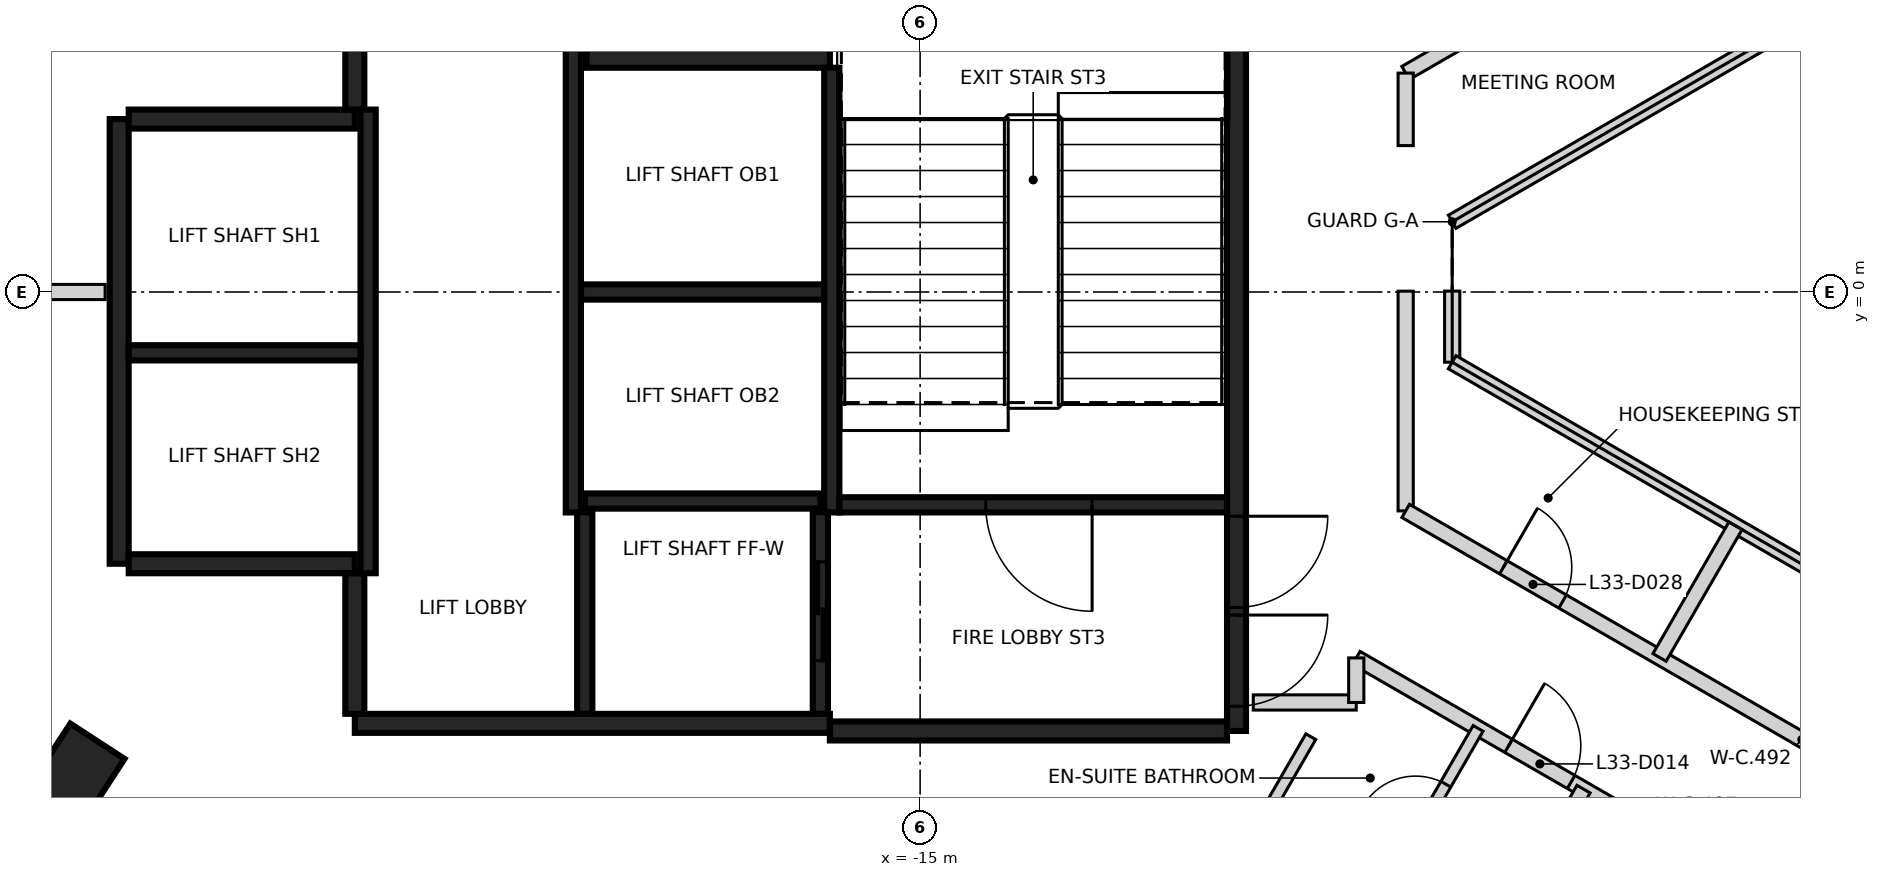
"""IFC4 building model, lengths in metres.
Left out: names, types, materials, properties, quantities, classifications, styles, units other than length and angle.
Written with IfcOpenShell. Run it as: python <this file> out.ifc"""

import sys

from ifc_helpers import new_model, si_unit, direction, frame, frame_2d, origin, origin_2d, place, context, subcontext, project, spatial, rectangle, extrude, element, fill, save


model = new_model("IFC4")
c1 = context("Model", 3, precision=1e-05, world=origin(), true_north=direction((0.0, 1.0)))
c2 = subcontext(c1, "Body", "Model", "MODEL_VIEW")
j1 = project(units=[si_unit("LENGTHUNIT", "METRE"), si_unit("PLANEANGLEUNIT", "RADIAN")], contexts=[c1])
p1 = place(None, origin())
s1 = spatial("IfcSite", under=j1, at=p1, CompositionType="ELEMENT")
p2 = place(p1, origin())
s2 = spatial("IfcBuilding", under=s1, at=p2, CompositionType="ELEMENT")
p3 = place(p2, frame((0.0, 0.0, 136.0)))
s3 = spatial("IfcBuildingStorey", under=s2, at=p3, CompositionType="ELEMENT", Elevation=136.0)
p4 = place(p3, frame((-26.165, -6.434, -0.4), z_axis=(0.0, 0.0, 1.0), x_axis=(0.545702747109, 0.837978825387, 0.0)))
e1 = element("IfcColumn", 1, at=p4, inside=s3, PredefinedType="COLUMN", context=c2, shape_type="SweptSolid", body=[
    extrude(rectangle(XDim=1.25, YDim=0.85, at=origin_2d()), origin(), (0.0, 0.0, 1.0), 3.6),
])
p5 = place(p3, frame((-10.837, 5.775, 0.0), z_axis=(0.0, 0.0, 1.0), x_axis=(0.0, -1.0, 0.0)))
e2 = element("IfcWall", 2, at=p5, inside=s3, PredefinedType="SHEAR", context=c2, shape_type="SweptSolid", body=[
    extrude(rectangle(XDim=11.55, YDim=0.25, at=frame_2d((5.775, 0.0))), origin(), (0.0, 0.0, 1.0), 3.2),
])
p6 = place(p5, frame((10.025, 0.0, 0.0)))
e3 = element("IfcOpeningElement", 3, at=p6, cuts=e2, PredefinedType="OPENING", context=c2, shape_type="SweptSolid", body=[
    extrude(rectangle(XDim=1.2, YDim=2.1, at=frame_2d((0.6, 1.05))), frame((0.0, 0.135, 0.0), z_axis=(0.0, -1.0, 0.0), x_axis=(1.0, 0.0, 0.0)), (0.0, 0.0, 1.0), 0.27),
])
p7 = place(p5, frame((8.725, 0.0, 0.0)))
e4 = element("IfcOpeningElement", 4, at=p7, cuts=e2, PredefinedType="OPENING", context=c2, shape_type="SweptSolid", body=[
    extrude(rectangle(XDim=1.2, YDim=2.1, at=frame_2d((0.6, 1.05))), frame((0.0, 0.135, 0.0), z_axis=(0.0, -1.0, 0.0), x_axis=(1.0, 0.0, 0.0)), (0.0, 0.0, 1.0), 0.27),
])
p8 = place(p3, frame((-16.187, -5.675, 0.0), z_axis=(0.0, 0.0, 1.0), x_axis=(-1.0, 0.0, 0.0)))
e5 = element("IfcWall", 5, at=p8, inside=s3, PredefinedType="SHEAR", context=c2, shape_type="SweptSolid", body=[
    extrude(rectangle(XDim=6.25, YDim=0.25, at=frame_2d((3.125, 0.0))), origin(), (0.0, 0.0, 1.0), 3.2),
])
p9 = place(p3, frame((-25.537, -3.575, 0.0), z_axis=(0.0, 0.0, 1.0), x_axis=(0.0, 1.0, 0.0)))
e6 = element("IfcWall", 6, at=p9, inside=s3, PredefinedType="SHEAR", context=c2, shape_type="SweptSolid", body=[
    extrude(rectangle(XDim=5.85, YDim=0.25, at=frame_2d((2.925, 0.0))), origin(), (0.0, 0.0, 1.0), 3.2),
])
p10 = place(p3, frame((-10.963, -5.775, 0.0), z_axis=(0.0, 0.0, 1.0), x_axis=(-1.0, 0.0, 0.0)))
e7 = element("IfcWall", 7, at=p10, inside=s3, PredefinedType="SHEAR", context=c2, shape_type="SweptSolid", body=[
    extrude(rectangle(XDim=5.225, YDim=0.25, at=frame_2d((2.612, 0.0))), origin(), (0.0, 0.0, 1.0), 3.2),
])
p11 = place(p3, frame((-19.387, 3.075, 0.0), z_axis=(0.0, 0.0, 1.0), x_axis=(1.0, 0.0, 0.0)))
e8 = element("IfcWall", 8, at=p11, inside=s3, PredefinedType="SHEAR", context=c2, shape_type="SweptSolid", body=[
    extrude(rectangle(XDim=3.2, YDim=0.25, at=frame_2d((1.6, 0.0))), origin(), (0.0, 0.0, 1.0), 3.2),
])
for number, where, z_axis, x_axis in (
    (9, (-22.437, -3.575, 0.0), (0.0, 0.0, 1.0), (-1.0, 0.0, 0.0)),
    (10, (-25.412, 2.275, 0.0), (0.0, 0.0, 1.0), (1.0, 0.0, 0.0)),
):
    element("IfcWall", number, at=place(p3, frame(where, z_axis=z_axis, x_axis=x_axis)), inside=s3, PredefinedType="SHEAR", context=c2, shape_type="SweptSolid", body=[
        extrude(rectangle(XDim=2.975, YDim=0.25, at=frame_2d((1.487, 0.0))), origin(), (0.0, 0.0, 1.0), 3.2),
    ])
p12 = place(p3, frame((-22.437, 2.4, 0.0), z_axis=(0.0, 0.0, 1.0), x_axis=(0.0, 1.0, 0.0)))
e11 = element("IfcWall", 11, at=p12, inside=s3, PredefinedType="SHEAR", context=c2, shape_type="SweptSolid", body=[
    extrude(rectangle(XDim=1.975, YDim=0.25, at=frame_2d((0.987, 0.0))), origin(), (0.0, 0.0, 1.0), 3.2),
])
p13 = place(p3, frame((-22.437, -5.55, 0.0), z_axis=(0.0, 0.0, 1.0), x_axis=(0.0, 1.0, 0.0)))
e12 = element("IfcWall", 12, at=p13, inside=s3, PredefinedType="SHEAR", context=c2, shape_type="SweptSolid", body=[
    extrude(rectangle(XDim=1.849, YDim=0.25, at=frame_2d((0.925, 0.0))), origin(), (0.0, 0.0, 1.0), 3.2),
])
p14 = place(p3, frame((-16.162, 2.951, 0.0), z_axis=(0.0, 0.0, 1.0), x_axis=(0.0, -1.0, 0.0)))
e13 = element("IfcWall", 13, at=p14, inside=s3, PredefinedType="SHEAR", context=c2, shape_type="SweptSolid", body=[
    extrude(rectangle(XDim=5.851, YDim=0.2, at=frame_2d((2.925, 0.0))), origin(), (0.0, 0.0, 1.0), 3.2),
])
for number, where, z_axis, x_axis in (
    (14, (-19.562, -2.9, 0.0), (0.0, 0.0, 1.0), (0.0, 1.0, 0.0)),
    (15, (-22.262, 2.4, 0.0), (0.0, 0.0, 1.0), (0.0, -1.0, 0.0)),
):
    element("IfcWall", number, at=place(p3, frame(where, z_axis=z_axis, x_axis=x_axis)), inside=s3, PredefinedType="SHEAR", context=c2, shape_type="SweptSolid", body=[
        extrude(rectangle(XDim=6.1, YDim=0.2, at=frame_2d((3.05, 0.0))), origin(), (0.0, 0.0, 1.0), 3.2),
    ])
p15 = place(p3, frame((-10.963, -2.8, 0.0), z_axis=(0.0, 0.0, 1.0), x_axis=(-1.0, 0.0, 0.0)))
e16 = element("IfcWall", 16, at=p15, inside=s3, PredefinedType="SHEAR", context=c2, shape_type="SweptSolid", body=[
    extrude(rectangle(XDim=5.098, YDim=0.2, at=frame_2d((2.549, 0.0))), origin(), (0.0, 0.0, 1.0), 3.2),
])
p16 = place(p15, frame((1.774, 0.0, 0.0)))
e17 = element("IfcOpeningElement", 17, at=p16, cuts=e16, PredefinedType="OPENING", context=c2, shape_type="SweptSolid", body=[
    extrude(rectangle(XDim=1.4, YDim=2.1, at=frame_2d((0.7, 1.05))), frame((0.0, 0.11, 0.0), z_axis=(0.0, -1.0, 0.0), x_axis=(1.0, 0.0, 0.0)), (0.0, 0.0, 1.0), 0.22),
])
p17 = place(p3, frame((-16.263, 0.0, 0.0), z_axis=(0.0, 0.0, 1.0), x_axis=(-1.0, 0.0, 0.0)))
e18 = element("IfcWall", 18, at=p17, inside=s3, PredefinedType="SHEAR", context=c2, shape_type="SweptSolid", body=[
    extrude(rectangle(XDim=3.198, YDim=0.2, at=frame_2d((1.599, 0.0))), origin(), (0.0, 0.0, 1.0), 3.2),
])
p18 = place(p3, frame((-22.363, -0.8, 0.0), z_axis=(0.0, 0.0, 1.0), x_axis=(-1.0, 0.0, 0.0)))
e19 = element("IfcWall", 19, at=p18, inside=s3, PredefinedType="SHEAR", context=c2, shape_type="SweptSolid", body=[
    extrude(rectangle(XDim=3.048, YDim=0.2, at=frame_2d((1.524, 0.0))), origin(), (0.0, 0.0, 1.0), 3.2),
])
p19 = place(p3, frame((-19.412, -2.75, 0.0), z_axis=(0.0, 0.0, 1.0), x_axis=(1.0, 0.0, 0.0)))
e20 = element("IfcWall", 20, at=p19, inside=s3, PredefinedType="SHEAR", context=c2, shape_type="SweptSolid", body=[
    extrude(rectangle(XDim=3.1, YDim=0.2, at=frame_2d((1.55, 0.0))), origin(), (0.0, 0.0, 1.0), 3.2),
])
p20 = place(p3, frame((-16.312, -2.898, 0.0), z_axis=(0.0, 0.0, 1.0), x_axis=(0.0, -1.0, 0.0)))
e21 = element("IfcWall", 21, at=p20, inside=s3, PredefinedType="SHEAR", context=c2, shape_type="SweptSolid", body=[
    extrude(rectangle(XDim=2.651, YDim=0.2, at=frame_2d((1.325, 0.0))), origin(), (0.0, 0.0, 1.0), 3.2),
])
p21 = place(p20, frame((0.652, 0.0, 0.0)))
e22 = element("IfcOpeningElement", 22, at=p21, cuts=e21, PredefinedType="OPENING", context=c2, shape_type="SweptSolid", body=[
    extrude(rectangle(XDim=1.3, YDim=2.1, at=frame_2d((0.65, 1.05))), frame((0.0, 0.11, 0.0), z_axis=(0.0, -1.0, 0.0), x_axis=(1.0, 0.0, 0.0)), (0.0, 0.0, 1.0), 0.22),
])
p22 = place(p3, frame((-19.412, -5.549, 0.0), z_axis=(0.0, 0.0, 1.0), x_axis=(0.0, 1.0, 0.0)))
e23 = element("IfcWall", 23, at=p22, inside=s3, PredefinedType="SHEAR", context=c2, shape_type="SweptSolid", body=[
    extrude(rectangle(XDim=2.651, YDim=0.2, at=frame_2d((1.325, 0.0))), origin(), (0.0, 0.0, 1.0), 3.2),
])
p23 = place(p3, frame((-10.617, -5.4, 0.0), z_axis=(0.0, 0.0, 1.0), x_axis=(1.0, 0.0, 0.0)))
e24 = element("IfcWall", 24, at=p23, inside=s3, PredefinedType="PARTITIONING", context=c2, shape_type="SweptSolid", body=[
    extrude(rectangle(XDim=1.355, YDim=0.2, at=frame_2d((0.677, 0.0))), origin(), (0.0, 0.0, 1.0), 3.2),
])
p24 = place(p3, frame((-9.262, -4.814, 0.0), z_axis=(0.0, 0.0, 1.0), x_axis=(0.866109782156, -0.499853823887, 0.0)))
e25 = element("IfcWall", 25, at=p24, inside=s3, PredefinedType="PARTITIONING", context=c2, shape_type="SweptSolid", body=[
    extrude(rectangle(XDim=7.776, YDim=0.2, at=frame_2d((3.888, 0.0))), origin(), (0.0, 0.0, 1.0), 3.2),
])
p25 = place(p24, frame((2.314, 0.0, 0.0)))
e26 = element("IfcOpeningElement", 26, at=p25, cuts=e25, PredefinedType="OPENING", context=c2, shape_type="SweptSolid", body=[
    extrude(rectangle(XDim=0.95, YDim=2.1, at=frame_2d((0.475, 1.05))), frame((0.0, 0.11, 0.0), z_axis=(0.0, -1.0, 0.0), x_axis=(1.0, 0.0, 0.0)), (0.0, 0.0, 1.0), 0.22),
])
p26 = place(p3, frame((-9.262, -5.4, 0.0), z_axis=(0.0, 0.0, 1.0), x_axis=(0.0, 1.0, 0.0)))
e27 = element("IfcWall", 27, at=p26, inside=s3, PredefinedType="PARTITIONING", context=c2, shape_type="SweptSolid", body=[
    extrude(rectangle(XDim=0.586, YDim=0.2, at=frame_2d((0.293, 0.0))), origin(), (0.0, 0.0, 1.0), 3.2),
])
p27 = place(p3, frame((-8.613, 2.881, 0.0), z_axis=(0.0, 0.0, 1.0), x_axis=(0.866103179807, 0.499865263774, 0.0)))
e28 = element("IfcWall", 28, at=p27, inside=s3, PredefinedType="PARTITIONING", context=c2, shape_type="SweptSolid", body=[
    extrude(rectangle(XDim=12.036, YDim=0.2, at=frame_2d((6.018, 0.0))), origin(), (0.0, 0.0, 1.0), 3.2),
])
p28 = place(p27, frame((9.652, 0.0, 0.0)))
e29 = element("IfcOpeningElement", 29, at=p28, cuts=e28, PredefinedType="OPENING", context=c2, shape_type="SweptSolid", body=[
    extrude(rectangle(XDim=0.9, YDim=2.1, at=frame_2d((0.45, 1.05))), frame((0.0, 0.11, 0.0), z_axis=(0.0, -1.0, 0.0), x_axis=(1.0, 0.0, 0.0)), (0.0, 0.0, 1.0), 0.22),
])
p29 = place(p27, frame((3.646, 0.0, 0.0)))
e30 = element("IfcOpeningElement", 30, at=p29, cuts=e28, PredefinedType="OPENING", context=c2, shape_type="SweptSolid", body=[
    extrude(rectangle(XDim=0.9, YDim=2.1, at=frame_2d((0.45, 1.05))), frame((0.0, 0.11, 0.0), z_axis=(0.0, -1.0, 0.0), x_axis=(1.0, 0.0, 0.0)), (0.0, 0.0, 1.0), 0.22),
])
p30 = place(p3, frame((-8.612, -2.88, 0.0), z_axis=(0.0, 0.0, 1.0), x_axis=(0.0, 1.0, 0.0)))
e31 = element("IfcWall", 31, at=p30, inside=s3, PredefinedType="PARTITIONING", context=c2, shape_type="SweptSolid", body=[
    extrude(rectangle(XDim=2.891, YDim=0.2, at=frame_2d((1.445, 0.0))), origin(), (0.0, 0.0, 1.0), 2.3),
])
p31 = place(p3, frame((-8.612, -2.88, 0.0), z_axis=(0.0, 0.0, 1.0), x_axis=(0.866035279512, -0.499982894348, 0.0)))
e32 = element("IfcWall", 32, at=p31, inside=s3, PredefinedType="PARTITIONING", context=c2, shape_type="SweptSolid", body=[
    extrude(rectangle(XDim=12.037, YDim=0.2, at=frame_2d((6.018, 0.0))), origin(), (0.0, 0.0, 1.0), 3.2),
])
p32 = place(p31, frame((1.484, 0.0, 0.0)))
e33 = element("IfcOpeningElement", 33, at=p32, cuts=e32, PredefinedType="OPENING", context=c2, shape_type="SweptSolid", body=[
    extrude(rectangle(XDim=0.9, YDim=2.1, at=frame_2d((0.45, 1.05))), frame((0.0, 0.11, 0.0), z_axis=(0.0, -1.0, 0.0), x_axis=(1.0, 0.0, 0.0)), (0.0, 0.0, 1.0), 0.22),
])
p33 = place(p31, frame((7.491, 0.0, 0.0)))
e34 = element("IfcOpeningElement", 34, at=p33, cuts=e32, PredefinedType="OPENING", context=c2, shape_type="SweptSolid", body=[
    extrude(rectangle(XDim=0.9, YDim=2.1, at=frame_2d((0.45, 1.05))), frame((0.0, 0.11, 0.0), z_axis=(0.0, -1.0, 0.0), x_axis=(1.0, 0.0, 0.0)), (0.0, 0.0, 1.0), 0.22),
])
p34 = place(p3, frame((-8.612, 1.926, 0.0), z_axis=(0.0, 0.0, 1.0), x_axis=(0.0, 1.0, 0.0)))
e35 = element("IfcWall", 35, at=p34, inside=s3, PredefinedType="PARTITIONING", context=c2, shape_type="SweptSolid", body=[
    extrude(rectangle(XDim=0.954, YDim=0.2, at=frame_2d((0.477, 0.0))), origin(), (0.0, 0.0, 1.0), 3.2),
])
p35 = place(p3, frame((-28.464, 0.0, 0.0), z_axis=(0.0, 0.0, 1.0), x_axis=(1.0, 0.0, 0.0)))
e36 = element("IfcWall", 36, at=p35, inside=s3, PredefinedType="PARTITIONING", context=c2, shape_type="SweptSolid", body=[
    extrude(rectangle(XDim=2.742, YDim=0.2, at=frame_2d((1.371, 0.0))), origin(), (0.0, 0.0, 1.0), 3.2),
])
p36 = place(p3, frame((-12.278, -16.946, 0.0), z_axis=(0.0, 0.0, 1.0), x_axis=(0.499887212932, 0.866090511637, 0.0)))
e37 = element("IfcWall", 37, at=p36, inside=s3, PredefinedType="PARTITIONING", context=c2, shape_type="SweptSolid", body=[
    extrude(rectangle(XDim=12.015, YDim=0.2, at=frame_2d((6.007, 0.0))), origin(), (0.0, 0.0, 1.0), 3.2),
])
p37 = place(p3, frame((-8.0, 0.924, 0.0), z_axis=(0.0, 0.0, 1.0), x_axis=(0.86604129137, 0.499972480886, 0.0)))
e38 = element("IfcWall", 38, at=p37, inside=s3, PredefinedType="PARTITIONING", context=c2, shape_type="SweptSolid", body=[
    extrude(rectangle(XDim=12.932, YDim=0.2, at=frame_2d((6.466, 0.0))), origin(), (0.0, 0.0, 1.0), 2.3),
])
p38 = place(p3, frame((-8.0, -0.924, 0.0), z_axis=(0.0, 0.0, 1.0), x_axis=(0.0, 1.0, 0.0)))
e39 = element("IfcWall", 39, at=p38, inside=s3, PredefinedType="PARTITIONING", context=c2, shape_type="SweptSolid", body=[
    extrude(rectangle(XDim=0.936, YDim=0.2, at=frame_2d((0.468, 0.0))), origin(), (0.0, 0.0, 1.0), 2.3),
])
p39 = place(p3, frame((-8.0, -0.924, 0.0), z_axis=(0.0, 0.0, 1.0), x_axis=(0.86604129137, -0.499972480886, 0.0)))
e40 = element("IfcWall", 40, at=p39, inside=s3, PredefinedType="PARTITIONING", context=c2, shape_type="SweptSolid", body=[
    extrude(rectangle(XDim=12.932, YDim=0.2, at=frame_2d((6.466, 0.0))), origin(), (0.0, 0.0, 1.0), 2.3),
])
p40 = place(p3, frame((-5.272, -4.808, 0.0), z_axis=(0.0, 0.0, 1.0), x_axis=(0.499880961361, 0.866094119867, 0.0)))
e41 = element("IfcWall", 41, at=p40, inside=s3, PredefinedType="PARTITIONING", context=c2, shape_type="SweptSolid", body=[
    extrude(rectangle(XDim=2.0, YDim=0.2, at=frame_2d((1.0, 0.0))), origin(), (0.0, 0.0, 1.0), 2.3),
])
p41 = place(p3, frame((-10.511, -6.977, 0.0), z_axis=(0.0, 0.0, 1.0), x_axis=(0.500274472704, 0.865866878891, 0.0)))
e42 = element("IfcWall", 42, at=p41, inside=s3, PredefinedType="PARTITIONING", context=c2, shape_type="SweptSolid", body=[
    extrude(rectangle(XDim=1.302, YDim=0.15, at=frame_2d((0.651, 0.0))), origin(), (0.0, 0.0, 1.0), 3.2),
])
p42 = place(p3, frame((-8.907, -7.903, 0.0), z_axis=(0.0, 0.0, 1.0), x_axis=(0.499925626596, 0.866068339032, 0.0)))
e43 = element("IfcWall", 43, at=p42, inside=s3, PredefinedType="PARTITIONING", context=c2, shape_type="SweptSolid", body=[
    extrude(rectangle(XDim=2.497, YDim=0.15, at=frame_2d((1.248, 0.0))), origin(), (0.0, 0.0, 1.0), 3.2),
])
p43 = place(p42, frame((0.848, 0.0, 0.0)))
e44 = element("IfcOpeningElement", 44, at=p43, cuts=e43, PredefinedType="OPENING", context=c2, shape_type="SweptSolid", body=[
    extrude(rectangle(XDim=0.8, YDim=2.1, at=frame_2d((0.4, 1.05))), frame((0.0, 0.085, 0.0), z_axis=(0.0, -1.0, 0.0), x_axis=(1.0, 0.0, 0.0)), (0.0, 0.0, 1.0), 0.17),
])
p44 = place(p21, origin())
e45 = element("IfcDoor", 45, at=p44, inside=s3, OperationType="SLIDING_TO_LEFT", PredefinedType="DOOR", context=c2, shape_type="SweptSolid", body=[
    extrude(rectangle(XDim=1.3, YDim=2.1, at=frame_2d((0.65, 1.05))), frame((0.0, 0.025, 0.0), z_axis=(0.0, -1.0, 0.0), x_axis=(1.0, 0.0, 0.0)), (0.0, 0.0, 1.0), 0.05),
])
fill(e22, e45)
p45 = place(p6, origin())
e46 = element("IfcDoor", 46, at=p45, inside=s3, OperationType="SINGLE_SWING_LEFT", PredefinedType="DOOR", context=c2, shape_type="SweptSolid", body=[
    extrude(rectangle(XDim=1.2, YDim=2.1, at=frame_2d((0.6, 1.05))), frame((0.0, 0.025, 0.0), z_axis=(0.0, -1.0, 0.0), x_axis=(1.0, 0.0, 0.0)), (0.0, 0.0, 1.0), 0.05),
])
fill(e3, e46)
p46 = place(p7, origin())
e47 = element("IfcDoor", 47, at=p46, inside=s3, OperationType="SINGLE_SWING_RIGHT", PredefinedType="DOOR", context=c2, shape_type="SweptSolid", body=[
    extrude(rectangle(XDim=1.2, YDim=2.1, at=frame_2d((0.6, 1.05))), frame((0.0, 0.025, 0.0), z_axis=(0.0, -1.0, 0.0), x_axis=(1.0, 0.0, 0.0)), (0.0, 0.0, 1.0), 0.05),
])
fill(e4, e47)
p47 = place(p16, origin())
e48 = element("IfcDoor", 48, at=p47, inside=s3, OperationType="SINGLE_SWING_LEFT", PredefinedType="DOOR", context=c2, shape_type="SweptSolid", body=[
    extrude(rectangle(XDim=1.4, YDim=2.1, at=frame_2d((0.7, 1.05))), frame((0.0, 0.025, 0.0), z_axis=(0.0, -1.0, 0.0), x_axis=(1.0, 0.0, 0.0)), (0.0, 0.0, 1.0), 0.05),
])
fill(e17, e48)
p48 = place(p25, frame((0.95, 0.0, 0.0), z_axis=(0.0, 0.0, 1.0), x_axis=(-1.0, 0.0, 0.0)))
e49 = element("IfcDoor", 49, at=p48, inside=s3, OperationType="SINGLE_SWING_LEFT", PredefinedType="DOOR", context=c2, shape_type="SweptSolid", body=[
    extrude(rectangle(XDim=0.95, YDim=2.1, at=frame_2d((0.475, 1.05))), frame((0.0, 0.025, 0.0), z_axis=(0.0, -1.0, 0.0), x_axis=(1.0, 0.0, 0.0)), (0.0, 0.0, 1.0), 0.05),
])
fill(e26, e49)
p49 = place(p43, origin())
e50 = element("IfcDoor", 50, at=p49, inside=s3, OperationType="SINGLE_SWING_LEFT", PredefinedType="DOOR", context=c2, shape_type="SweptSolid", body=[
    extrude(rectangle(XDim=0.8, YDim=2.1, at=frame_2d((0.4, 1.05))), frame((0.0, 0.025, 0.0), z_axis=(0.0, -1.0, 0.0), x_axis=(1.0, 0.0, 0.0)), (0.0, 0.0, 1.0), 0.05),
])
fill(e44, e50)
p50 = place(p32, origin())
e51 = element("IfcDoor", 51, at=p50, inside=s3, OperationType="SINGLE_SWING_LEFT", PredefinedType="DOOR", context=c2, shape_type="SweptSolid", body=[
    extrude(rectangle(XDim=0.9, YDim=2.1, at=frame_2d((0.45, 1.05))), frame((0.0, 0.025, 0.0), z_axis=(0.0, -1.0, 0.0), x_axis=(1.0, 0.0, 0.0)), (0.0, 0.0, 1.0), 0.05),
])
fill(e33, e51)
save(model, sys.argv[1])
